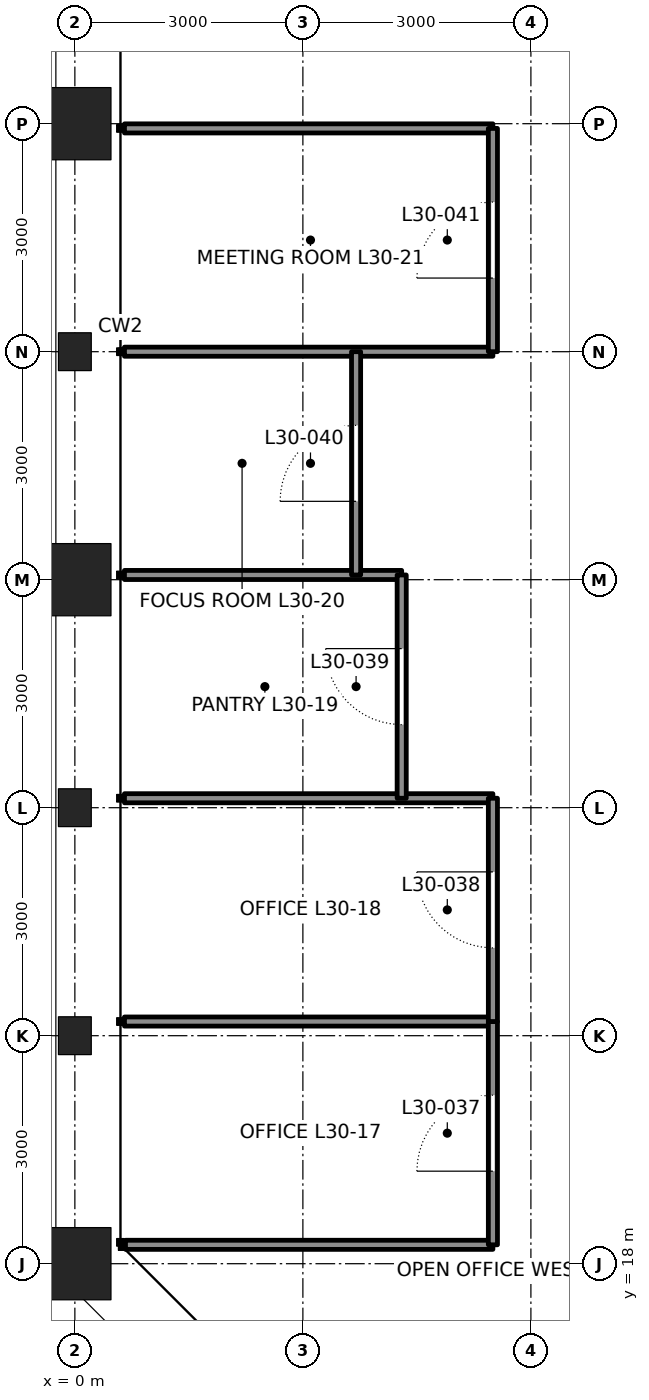
"""IFC4 building model, lengths in metres.
Left out: names, types, materials, properties, quantities, classifications, styles, units other than length and angle.
Written with IfcOpenShell. Run it as: python <this file> out.ifc"""

import sys

from ifc_helpers import new_model, si_unit, direction, frame, frame_2d, origin, origin_2d, place, context, subcontext, project, spatial, rectangle, hollow_rectangle, i_section, extrude, element, fill, save


model = new_model("IFC4")
c1 = context("Model", 3, precision=1e-05, world=origin(), true_north=direction((0.0, 1.0)))
c2 = subcontext(c1, "Body", "Model", "MODEL_VIEW")
j1 = project(units=[si_unit("LENGTHUNIT", "METRE"), si_unit("PLANEANGLEUNIT", "RADIAN")], contexts=[c1])
p1 = place(None, origin())
s1 = spatial("IfcSite", under=j1, at=p1, CompositionType="ELEMENT")
p2 = place(p1, origin())
s2 = spatial("IfcBuilding", under=s1, at=p2, CompositionType="ELEMENT")
p3 = place(p2, frame((0.0, 0.0, 140.4)))
s3 = spatial("IfcBuildingStorey", under=s2, at=p3, CompositionType="ELEMENT", Elevation=140.4)
p4 = place(p3, frame((0.0, 33.0, 0.0), z_axis=(0.0, 0.0, 1.0), x_axis=(-1.0, 0.0, 0.0)))
e1 = element("IfcColumn", 1, at=p4, inside=s3, PredefinedType="COLUMN", context=c2, shape_type="SweptSolid", body=[
    extrude(hollow_rectangle(XDim=0.95, YDim=0.95, WallThickness=0.11, at=origin_2d()), origin(), (0.0, 0.0, 1.0), 4.2),
])
p5 = place(p3, frame((0.0, 30.0, 0.0), z_axis=(0.0, 0.0, 1.0), x_axis=(-1.0, 0.0, 0.0)))
e2 = element("IfcColumn", 2, at=p5, inside=s3, PredefinedType="COLUMN", context=c2, shape_type="SweptSolid", body=[
    extrude(i_section(OverallWidth=0.432, OverallDepth=0.498, WebThickness=0.056, FlangeThickness=0.089, at=origin_2d()), origin(), (0.0, 0.0, 1.0), 4.2),
])
p6 = place(p3, frame((0.0, 27.0, 0.0), z_axis=(0.0, 0.0, 1.0), x_axis=(-1.0, 0.0, 0.0)))
e3 = element("IfcColumn", 3, at=p6, inside=s3, PredefinedType="COLUMN", context=c2, shape_type="SweptSolid", body=[
    extrude(hollow_rectangle(XDim=0.95, YDim=0.95, WallThickness=0.11, at=origin_2d()), origin(), (0.0, 0.0, 1.0), 4.2),
])
for number, where, z_axis, x_axis in (
    (4, (0.0, 24.0, 0.0), (0.0, 0.0, 1.0), (-1.0, 0.0, 0.0)),
    (5, (0.0, 21.0, 0.0), (0.0, 0.0, 1.0), (-1.0, 0.0, 0.0)),
):
    element("IfcColumn", number, at=place(p3, frame(where, z_axis=z_axis, x_axis=x_axis)), inside=s3, PredefinedType="COLUMN", context=c2, shape_type="SweptSolid", body=[
        extrude(i_section(OverallWidth=0.432, OverallDepth=0.498, WebThickness=0.056, FlangeThickness=0.089, at=origin_2d()), origin(), (0.0, 0.0, 1.0), 4.2),
    ])
p7 = place(p3, frame((0.0, 18.0, 0.0), z_axis=(0.0, 0.0, 1.0), x_axis=(-1.0, 0.0, 0.0)))
e6 = element("IfcColumn", 6, at=p7, inside=s3, PredefinedType="COLUMN", context=c2, shape_type="SweptSolid", body=[
    extrude(hollow_rectangle(XDim=0.95, YDim=0.95, WallThickness=0.095, at=origin_2d()), origin(), (0.0, 0.0, 1.0), 4.2),
])
p8 = place(p3, frame((0.666, 18.249, 0.0), z_axis=(0.0, 0.0, 1.0), x_axis=(1.0, 0.0, 0.0)))
e7 = element("IfcWall", 7, at=p8, inside=s3, PredefinedType="PARTITIONING", context=c2, shape_type="SweptSolid", body=[
    extrude(rectangle(XDim=4.834, YDim=0.12, at=frame_2d((2.417, 0.0))), origin(), (0.0, 0.0, 1.0), 4.04),
])
p9 = place(p3, frame((0.653, 21.186, 0.0), z_axis=(0.0, 0.0, 1.0), x_axis=(1.0, 0.0, 0.0)))
e8 = element("IfcWall", 8, at=p9, inside=s3, PredefinedType="PARTITIONING", context=c2, shape_type="SweptSolid", body=[
    extrude(rectangle(XDim=4.847, YDim=0.12, at=frame_2d((2.424, 0.0))), origin(), (0.0, 0.0, 1.0), 4.04),
])
p10 = place(p3, frame((0.653, 24.124, 0.0), z_axis=(0.0, 0.0, 1.0), x_axis=(1.0, 0.0, 0.0)))
e9 = element("IfcWall", 9, at=p10, inside=s3, PredefinedType="PARTITIONING", context=c2, shape_type="SweptSolid", body=[
    extrude(rectangle(XDim=4.847, YDim=0.12, at=frame_2d((2.424, 0.0))), origin(), (0.0, 0.0, 1.0), 3.357),
])
p11 = place(p3, frame((0.653, 27.062, 0.0), z_axis=(0.0, 0.0, 1.0), x_axis=(1.0, 0.0, 0.0)))
e10 = element("IfcWall", 10, at=p11, inside=s3, PredefinedType="PARTITIONING", context=c2, shape_type="SweptSolid", body=[
    extrude(rectangle(XDim=3.647, YDim=0.12, at=frame_2d((1.824, 0.0))), origin(), (0.0, 0.0, 1.0), 3.357),
])
p12 = place(p3, frame((0.653, 30.0, 0.0), z_axis=(0.0, 0.0, 1.0), x_axis=(1.0, 0.0, 0.0)))
e11 = element("IfcWall", 11, at=p12, inside=s3, PredefinedType="PARTITIONING", context=c2, shape_type="SweptSolid", body=[
    extrude(rectangle(XDim=4.847, YDim=0.12, at=frame_2d((2.424, 0.0))), origin(), (0.0, 0.0, 1.0), 3.357),
])
p13 = place(p3, frame((0.653, 32.938, 0.0), z_axis=(0.0, 0.0, 1.0), x_axis=(1.0, 0.0, 0.0)))
e12 = element("IfcWall", 12, at=p13, inside=s3, PredefinedType="PARTITIONING", context=c2, shape_type="SweptSolid", body=[
    extrude(rectangle(XDim=4.847, YDim=0.12, at=frame_2d((2.424, 0.0))), origin(), (0.0, 0.0, 1.0), 3.271),
])
p14 = place(p3, frame((5.5, 18.249, 0.0), z_axis=(0.0, 0.0, 1.0), x_axis=(0.0, 1.0, 0.0)))
e13 = element("IfcWall", 13, at=p14, inside=s3, PredefinedType="PARTITIONING", context=c2, shape_type="SweptSolid", body=[
    extrude(rectangle(XDim=2.938, YDim=0.12, at=frame_2d((1.469, 0.0))), origin(), (0.0, 0.0, 1.0), 4.04),
])
p15 = place(p14, frame((0.969, 0.0, 0.0)))
e14 = element("IfcOpeningElement", 14, at=p15, cuts=e13, PredefinedType="OPENING", context=c2, shape_type="SweptSolid", body=[
    extrude(rectangle(XDim=1.0, YDim=2.4, at=frame_2d((0.5, 1.2))), frame((0.0, 0.07, 0.0), z_axis=(0.0, -1.0, 0.0), x_axis=(1.0, 0.0, 0.0)), (0.0, 0.0, 1.0), 0.14),
])
p16 = place(p3, frame((5.5, 21.186, 0.0), z_axis=(0.0, 0.0, 1.0), x_axis=(0.0, 1.0, 0.0)))
e15 = element("IfcWall", 15, at=p16, inside=s3, PredefinedType="PARTITIONING", context=c2, shape_type="SweptSolid", body=[
    extrude(rectangle(XDim=2.938, YDim=0.12, at=frame_2d((1.469, 0.0))), origin(), (0.0, 0.0, 1.0), 4.04),
])
p17 = place(p16, frame((0.969, 0.0, 0.0)))
e16 = element("IfcOpeningElement", 16, at=p17, cuts=e15, PredefinedType="OPENING", context=c2, shape_type="SweptSolid", body=[
    extrude(rectangle(XDim=1.0, YDim=2.4, at=frame_2d((0.5, 1.2))), frame((0.0, 0.07, 0.0), z_axis=(0.0, -1.0, 0.0), x_axis=(1.0, 0.0, 0.0)), (0.0, 0.0, 1.0), 0.14),
])
p18 = place(p3, frame((4.3, 24.124, 0.0), z_axis=(0.0, 0.0, 1.0), x_axis=(0.0, 1.0, 0.0)))
e17 = element("IfcWall", 17, at=p18, inside=s3, PredefinedType="PARTITIONING", context=c2, shape_type="SweptSolid", body=[
    extrude(rectangle(XDim=2.938, YDim=0.12, at=frame_2d((1.469, 0.0))), origin(), (0.0, 0.0, 1.0), 4.04),
])
p19 = place(p18, frame((0.969, 0.0, 0.0)))
e18 = element("IfcOpeningElement", 18, at=p19, cuts=e17, PredefinedType="OPENING", context=c2, shape_type="SweptSolid", body=[
    extrude(rectangle(XDim=1.0, YDim=2.4, at=frame_2d((0.5, 1.2))), frame((0.0, 0.07, 0.0), z_axis=(0.0, -1.0, 0.0), x_axis=(1.0, 0.0, 0.0)), (0.0, 0.0, 1.0), 0.14),
])
p20 = place(p3, frame((3.7, 27.062, 0.0), z_axis=(0.0, 0.0, 1.0), x_axis=(0.0, 1.0, 0.0)))
e19 = element("IfcWall", 19, at=p20, inside=s3, PredefinedType="PARTITIONING", context=c2, shape_type="SweptSolid", body=[
    extrude(rectangle(XDim=2.938, YDim=0.12, at=frame_2d((1.469, 0.0))), origin(), (0.0, 0.0, 1.0), 4.04),
])
p21 = place(p20, frame((0.969, 0.0, 0.0)))
e20 = element("IfcOpeningElement", 20, at=p21, cuts=e19, PredefinedType="OPENING", context=c2, shape_type="SweptSolid", body=[
    extrude(rectangle(XDim=1.0, YDim=2.4, at=frame_2d((0.5, 1.2))), frame((0.0, 0.07, 0.0), z_axis=(0.0, -1.0, 0.0), x_axis=(1.0, 0.0, 0.0)), (0.0, 0.0, 1.0), 0.14),
])
p22 = place(p3, frame((5.5, 30.0, 0.0), z_axis=(0.0, 0.0, 1.0), x_axis=(0.0, 1.0, 0.0)))
e21 = element("IfcWall", 21, at=p22, inside=s3, PredefinedType="PARTITIONING", context=c2, shape_type="SweptSolid", body=[
    extrude(rectangle(XDim=2.938, YDim=0.12, at=frame_2d((1.469, 0.0))), origin(), (0.0, 0.0, 1.0), 4.04),
])
p23 = place(p22, frame((0.969, 0.0, 0.0)))
e22 = element("IfcOpeningElement", 22, at=p23, cuts=e21, PredefinedType="OPENING", context=c2, shape_type="SweptSolid", body=[
    extrude(rectangle(XDim=1.0, YDim=2.4, at=frame_2d((0.5, 1.2))), frame((0.0, 0.07, 0.0), z_axis=(0.0, -1.0, 0.0), x_axis=(1.0, 0.0, 0.0)), (0.0, 0.0, 1.0), 0.14),
])
p24 = place(p15, origin())
e23 = element("IfcDoor", 23, at=p24, inside=s3, OperationType="SINGLE_SWING_LEFT", PredefinedType="DOOR", context=c2, shape_type="SweptSolid", body=[
    extrude(rectangle(XDim=1.0, YDim=2.4, at=frame_2d((0.5, 1.2))), frame((0.0, 0.025, 0.0), z_axis=(0.0, -1.0, 0.0), x_axis=(1.0, 0.0, 0.0)), (0.0, 0.0, 1.0), 0.05),
])
fill(e14, e23)
p25 = place(p17, origin())
e24 = element("IfcDoor", 24, at=p25, inside=s3, OperationType="SINGLE_SWING_RIGHT", PredefinedType="DOOR", context=c2, shape_type="SweptSolid", body=[
    extrude(rectangle(XDim=1.0, YDim=2.4, at=frame_2d((0.5, 1.2))), frame((0.0, 0.025, 0.0), z_axis=(0.0, -1.0, 0.0), x_axis=(1.0, 0.0, 0.0)), (0.0, 0.0, 1.0), 0.05),
])
fill(e16, e24)
p26 = place(p19, origin())
e25 = element("IfcDoor", 25, at=p26, inside=s3, OperationType="SINGLE_SWING_RIGHT", PredefinedType="DOOR", context=c2, shape_type="SweptSolid", body=[
    extrude(rectangle(XDim=1.0, YDim=2.4, at=frame_2d((0.5, 1.2))), frame((0.0, 0.025, 0.0), z_axis=(0.0, -1.0, 0.0), x_axis=(1.0, 0.0, 0.0)), (0.0, 0.0, 1.0), 0.05),
])
fill(e18, e25)
p27 = place(p21, origin())
e26 = element("IfcDoor", 26, at=p27, inside=s3, OperationType="SINGLE_SWING_LEFT", PredefinedType="DOOR", context=c2, shape_type="SweptSolid", body=[
    extrude(rectangle(XDim=1.0, YDim=2.4, at=frame_2d((0.5, 1.2))), frame((0.0, 0.025, 0.0), z_axis=(0.0, -1.0, 0.0), x_axis=(1.0, 0.0, 0.0)), (0.0, 0.0, 1.0), 0.05),
])
fill(e20, e26)
p28 = place(p23, origin())
e27 = element("IfcDoor", 27, at=p28, inside=s3, OperationType="SINGLE_SWING_LEFT", PredefinedType="DOOR", context=c2, shape_type="SweptSolid", body=[
    extrude(rectangle(XDim=1.0, YDim=2.4, at=frame_2d((0.5, 1.2))), frame((0.0, 0.025, 0.0), z_axis=(0.0, -1.0, 0.0), x_axis=(1.0, 0.0, 0.0)), (0.0, 0.0, 1.0), 0.05),
])
fill(e22, e27)
save(model, sys.argv[1])
